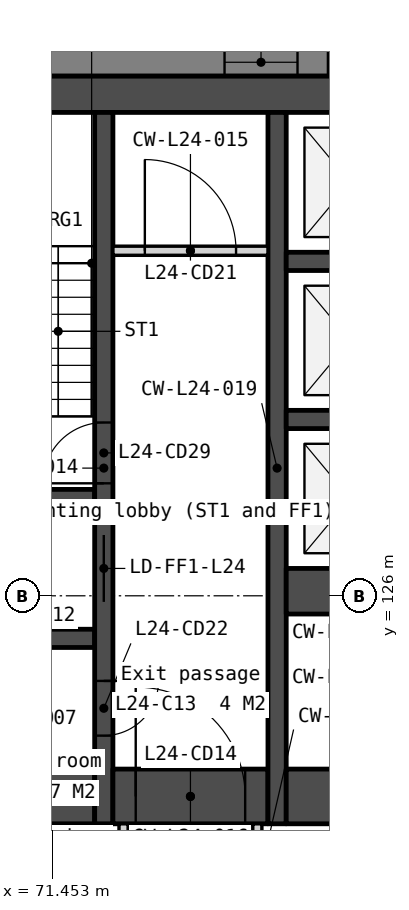
"""IFC4 building model, lengths in metres.
Left out: names, types, materials, properties, quantities, classifications, styles, units other than length and angle.
Written with IfcOpenShell. Run it as: python <this file> out.ifc"""

import sys

from ifc_helpers import new_model, si_unit, direction, frame, frame_2d, origin, place, context, subcontext, project, spatial, polyline, rectangle, outline, extrude, element, fill, save


model = new_model("IFC4")
c1 = context("Model", 3, precision=1e-05, world=origin(), true_north=direction((0.0, 1.0)))
c2 = subcontext(c1, "Body", "Model", "MODEL_VIEW")
j1 = project(units=[si_unit("LENGTHUNIT", "METRE"), si_unit("PLANEANGLEUNIT", "RADIAN")], contexts=[c1])
p1 = place(None, origin())
s1 = spatial("IfcSite", under=j1, at=p1, CompositionType="ELEMENT")
p2 = place(p1, origin())
s2 = spatial("IfcBuilding", under=s1, at=p2, CompositionType="ELEMENT")
p3 = place(p2, frame((0.0, 0.0, 99.3)))
s3 = spatial("IfcBuildingStorey", under=s2, at=p3, CompositionType="ELEMENT", Elevation=99.3)
p4 = place(p3, frame((66.0, 134.25, 0.0), z_axis=(0.0, 0.0, 1.0), x_axis=(1.0, 0.0, 0.0)))
e1 = element("IfcWall", 1, at=p4, inside=s3, PredefinedType="SOLIDWALL", context=c2, shape_type="SweptSolid", body=[
    extrude(rectangle(XDim=28.0, YDim=0.6, at=frame_2d((14.0, 0.0))), origin(), (0.0, 0.0, 1.0), 3.35),
])
for number, where, z_axis, x_axis in (
    (2, (69.6, 127.6, 0.0), (0.0, 0.0, 1.0), (1.0, 0.0, 0.0)),
    (3, (69.6, 125.3, 0.0), (0.0, 0.0, 1.0), (1.0, 0.0, 0.0)),
):
    element("IfcWall", number, at=place(p3, frame(where, z_axis=z_axis, x_axis=x_axis)), inside=s3, PredefinedType="SOLIDWALL", context=c2, shape_type="SweptSolid", body=[
        extrude(rectangle(XDim=2.55, YDim=0.3, at=frame_2d((1.275, 0.0))), origin(), (0.0, 0.0, 1.0), 3.35),
    ])
p5 = place(p3, frame((69.6, 122.7, 0.0), z_axis=(0.0, 0.0, 1.0), x_axis=(1.0, 0.0, 0.0)))
e4 = element("IfcWall", 4, at=p5, inside=s3, PredefinedType="SOLIDWALL", context=c2, shape_type="SweptSolid", body=[
    extrude(rectangle(XDim=2.55, YDim=0.9, at=frame_2d((1.275, 0.0))), origin(), (0.0, 0.0, 1.0), 3.35),
])
p6 = place(p3, frame((72.3, 133.95, 0.0), z_axis=(0.0, 0.0, 1.0), x_axis=(0.0, -1.0, 0.0)))
e5 = element("IfcWall", 5, at=p6, inside=s3, PredefinedType="SOLIDWALL", context=c2, shape_type="SweptSolid", body=[
    extrude(rectangle(XDim=11.7, YDim=0.3, at=frame_2d((5.85, 0.0))), origin(), (0.0, 0.0, 1.0), 3.35),
])
p7 = place(p6, frame((6.95, 0.0, 0.0)))
e6 = element("IfcOpeningElement", 6, at=p7, cuts=e5, PredefinedType="OPENING", context=c2, shape_type="SweptSolid", body=[
    extrude(rectangle(XDim=1.1, YDim=2.1, at=frame_2d((0.55, 1.05))), frame((0.0, 0.16, 0.0), z_axis=(0.0, -1.0, 0.0), x_axis=(1.0, 0.0, 0.0)), (0.0, 0.0, 1.0), 0.32),
])
p8 = place(p6, frame((9.35, 0.0, 0.0)))
e7 = element("IfcOpeningElement", 7, at=p8, cuts=e5, PredefinedType="OPENING", context=c2, shape_type="SweptSolid", body=[
    extrude(rectangle(XDim=0.9, YDim=2.1, at=frame_2d((0.45, 1.05))), frame((0.0, 0.16, 0.0), z_axis=(0.0, -1.0, 0.0), x_axis=(1.0, 0.0, 0.0)), (0.0, 0.0, 1.0), 0.32),
])
p9 = place(p6, frame((5.1, 0.0, 0.0)))
e8 = element("IfcOpeningElement", 8, at=p9, cuts=e5, PredefinedType="OPENING", context=c2, shape_type="SweptSolid", body=[
    extrude(rectangle(XDim=1.0, YDim=2.1, at=frame_2d((0.5, 1.05))), frame((0.0, 0.16, 0.0), z_axis=(0.0, -1.0, 0.0), x_axis=(1.0, 0.0, 0.0)), (0.0, 0.0, 1.0), 0.32),
])
p10 = place(p3, frame((72.45, 131.675, 0.0), z_axis=(0.0, 0.0, 1.0), x_axis=(1.0, 0.0, 0.0)))
e9 = element("IfcWall", 9, at=p10, inside=s3, PredefinedType="PARTITIONING", context=c2, shape_type="SweptSolid", body=[
    extrude(rectangle(XDim=2.55, YDim=0.15, at=frame_2d((1.275, 0.0))), origin(), (0.0, 0.0, 1.0), 3.35),
])
p11 = place(p10, frame((0.525, 0.0, 0.0)))
e10 = element("IfcOpeningElement", 10, at=p11, cuts=e9, PredefinedType="OPENING", context=c2, shape_type="SweptSolid", body=[
    extrude(rectangle(XDim=1.5, YDim=2.1, at=frame_2d((0.75, 1.05))), frame((0.0, 0.085, 0.0), z_axis=(0.0, -1.0, 0.0), x_axis=(1.0, 0.0, 0.0)), (0.0, 0.0, 1.0), 0.17),
])
p12 = place(p3, frame((72.45, 122.7, 0.0), z_axis=(0.0, 0.0, 1.0), x_axis=(1.0, 0.0, 0.0)))
e11 = element("IfcWall", 11, at=p12, inside=s3, PredefinedType="SOLIDWALL", context=c2, shape_type="SweptSolid", body=[
    extrude(rectangle(XDim=2.55, YDim=0.9, at=frame_2d((1.275, 0.0))), origin(), (0.0, 0.0, 1.0), 3.35),
])
p13 = place(p12, frame((0.375, 0.0, 0.0)))
e12 = element("IfcOpeningElement", 12, at=p13, cuts=e11, PredefinedType="OPENING", context=c2, shape_type="SweptSolid", body=[
    extrude(rectangle(XDim=1.8, YDim=2.1, at=frame_2d((0.9, 1.05))), frame((0.0, 0.46, 0.0), z_axis=(0.0, -1.0, 0.0), x_axis=(1.0, 0.0, 0.0)), (0.0, 0.0, 1.0), 0.92),
])
for number, where, z_axis, x_axis in (
    (13, (72.625, 122.25, 0.0), (0.0, 0.0, 1.0), (0.0, -1.0, 0.0)),
    (14, (74.825, 122.25, 0.0), (0.0, 0.0, 1.0), (0.0, -1.0, 0.0)),
):
    element("IfcWall", number, at=place(p3, frame(where, z_axis=z_axis, x_axis=x_axis)), inside=s3, PredefinedType="PARTITIONING", context=c2, shape_type="SweptSolid", body=[
        extrude(rectangle(XDim=2.1, YDim=0.15, at=frame_2d((1.05, 0.0))), origin(), (0.0, 0.0, 1.0), 3.35),
    ])
p14 = place(p3, frame((75.15, 133.95, 0.0), z_axis=(0.0, 0.0, 1.0), x_axis=(0.0, -1.0, 0.0)))
e15 = element("IfcWall", 15, at=p14, inside=s3, PredefinedType="SOLIDWALL", context=c2, shape_type="SweptSolid", body=[
    extrude(rectangle(XDim=11.7, YDim=0.3, at=frame_2d((5.85, 0.0))), origin(), (0.0, 0.0, 1.0), 3.35),
])
for number, where, z_axis, x_axis in (
    (16, (75.3, 131.5, 0.0), (0.0, 0.0, 1.0), (1.0, 0.0, 0.0)),
    (17, (75.3, 128.9, 0.0), (0.0, 0.0, 1.0), (1.0, 0.0, 0.0)),
):
    element("IfcWall", number, at=place(p3, frame(where, z_axis=z_axis, x_axis=x_axis)), inside=s3, PredefinedType="SOLIDWALL", context=c2, shape_type="SweptSolid", body=[
        extrude(rectangle(XDim=2.1, YDim=0.3, at=frame_2d((1.05, 0.0))), origin(), (0.0, 0.0, 1.0), 3.35),
    ])
p15 = place(p3, frame((75.3, 126.075, 0.0), z_axis=(0.0, 0.0, 1.0), x_axis=(1.0, 0.0, 0.0)))
e18 = element("IfcWall", 18, at=p15, inside=s3, PredefinedType="SOLIDWALL", context=c2, shape_type="SweptSolid", body=[
    extrude(rectangle(XDim=2.1, YDim=0.75, at=frame_2d((1.05, 0.0))), origin(), (0.0, 0.0, 1.0), 3.35),
])
p16 = place(p3, frame((75.3, 122.7, 0.0), z_axis=(0.0, 0.0, 1.0), x_axis=(1.0, 0.0, 0.0)))
e19 = element("IfcWall", 19, at=p16, inside=s3, PredefinedType="SOLIDWALL", context=c2, shape_type="SweptSolid", body=[
    extrude(rectangle(XDim=6.2, YDim=0.9, at=frame_2d((3.1, 0.0))), origin(), (0.0, 0.0, 1.0), 3.35),
])
p17 = place(p3, frame((101.322, 134.775, -0.15), z_axis=(0.0, 0.0, 1.0), x_axis=(-1.0, 0.0, 0.0)))
e20 = element("IfcWall", 20, at=p17, inside=s3, PredefinedType="SOLIDWALL", context=c2, shape_type="SweptSolid", body=[
    extrude(outline(polyline([(42.643, 0.0), (42.643, 3.5), (0.0, 3.5), (0.0, 0.0), (42.643, 0.0)])), frame((0.0, 0.225, 0.0), z_axis=(0.0, -1.0, 0.0), x_axis=(1.0, 0.0, 0.0)), (0.0, 0.0, 1.0), 0.45),
])
p18 = place(p17, frame((7.079, 0.0, 1.05)))
e21 = element("IfcOpeningElement", 21, at=p18, cuts=e20, PredefinedType="OPENING", context=c2, shape_type="SweptSolid", body=[
    extrude(rectangle(XDim=1.2, YDim=1.5, at=frame_2d((0.6, 0.75))), frame((0.0, 0.235, 0.0), z_axis=(0.0, -1.0, 0.0), x_axis=(1.0, 0.0, 0.0)), (0.0, 0.0, 1.0), 0.47),
])
p19 = place(p17, frame((8.779, 0.0, 1.05)))
e22 = element("IfcOpeningElement", 22, at=p19, cuts=e20, PredefinedType="OPENING", context=c2, shape_type="SweptSolid", body=[
    extrude(rectangle(XDim=1.2, YDim=1.5, at=frame_2d((0.6, 0.75))), frame((0.0, 0.235, 0.0), z_axis=(0.0, -1.0, 0.0), x_axis=(1.0, 0.0, 0.0)), (0.0, 0.0, 1.0), 0.47),
])
p20 = place(p17, frame((15.607, 0.0, 1.05)))
e23 = element("IfcOpeningElement", 23, at=p20, cuts=e20, PredefinedType="OPENING", context=c2, shape_type="SweptSolid", body=[
    extrude(rectangle(XDim=1.2, YDim=1.5, at=frame_2d((0.6, 0.75))), frame((0.0, 0.235, 0.0), z_axis=(0.0, -1.0, 0.0), x_axis=(1.0, 0.0, 0.0)), (0.0, 0.0, 1.0), 0.47),
])
p21 = place(p17, frame((17.307, 0.0, 1.05)))
e24 = element("IfcOpeningElement", 24, at=p21, cuts=e20, PredefinedType="OPENING", context=c2, shape_type="SweptSolid", body=[
    extrude(rectangle(XDim=1.2, YDim=1.5, at=frame_2d((0.6, 0.75))), frame((0.0, 0.235, 0.0), z_axis=(0.0, -1.0, 0.0), x_axis=(1.0, 0.0, 0.0)), (0.0, 0.0, 1.0), 0.47),
])
p22 = place(p17, frame((24.136, 0.0, 1.05)))
e25 = element("IfcOpeningElement", 25, at=p22, cuts=e20, PredefinedType="OPENING", context=c2, shape_type="SweptSolid", body=[
    extrude(rectangle(XDim=1.2, YDim=1.5, at=frame_2d((0.6, 0.75))), frame((0.0, 0.235, 0.0), z_axis=(0.0, -1.0, 0.0), x_axis=(1.0, 0.0, 0.0)), (0.0, 0.0, 1.0), 0.47),
])
p23 = place(p17, frame((25.836, 0.0, 1.05)))
e26 = element("IfcOpeningElement", 26, at=p23, cuts=e20, PredefinedType="OPENING", context=c2, shape_type="SweptSolid", body=[
    extrude(rectangle(XDim=1.2, YDim=1.5, at=frame_2d((0.6, 0.75))), frame((0.0, 0.235, 0.0), z_axis=(0.0, -1.0, 0.0), x_axis=(1.0, 0.0, 0.0)), (0.0, 0.0, 1.0), 0.47),
])
p24 = place(p17, frame((32.665, 0.0, 1.05)))
e27 = element("IfcOpeningElement", 27, at=p24, cuts=e20, PredefinedType="OPENING", context=c2, shape_type="SweptSolid", body=[
    extrude(rectangle(XDim=1.2, YDim=1.5, at=frame_2d((0.6, 0.75))), frame((0.0, 0.235, 0.0), z_axis=(0.0, -1.0, 0.0), x_axis=(1.0, 0.0, 0.0)), (0.0, 0.0, 1.0), 0.47),
])
p25 = place(p17, frame((34.365, 0.0, 1.05)))
e28 = element("IfcOpeningElement", 28, at=p25, cuts=e20, PredefinedType="OPENING", context=c2, shape_type="SweptSolid", body=[
    extrude(rectangle(XDim=1.2, YDim=1.5, at=frame_2d((0.6, 0.75))), frame((0.0, 0.235, 0.0), z_axis=(0.0, -1.0, 0.0), x_axis=(1.0, 0.0, 0.0)), (0.0, 0.0, 1.0), 0.47),
])
p26 = place(p7, origin())
e29 = element("IfcDoor", 29, at=p26, inside=s3, OperationType="SLIDING_TO_LEFT", PredefinedType="DOOR", context=c2, shape_type="SweptSolid", body=[
    extrude(rectangle(XDim=1.1, YDim=2.1, at=frame_2d((0.55, 1.05))), frame((0.0, 0.025, 0.0), z_axis=(0.0, -1.0, 0.0), x_axis=(1.0, 0.0, 0.0)), (0.0, 0.0, 1.0), 0.05),
])
fill(e6, e29)
p27 = place(p13, origin())
e30 = element("IfcDoor", 30, at=p27, inside=s3, OperationType="DOUBLE_DOOR_DOUBLE_SWING", PredefinedType="DOOR", context=c2, shape_type="SweptSolid", body=[
    extrude(rectangle(XDim=1.8, YDim=2.1, at=frame_2d((0.9, 1.05))), frame((0.0, 0.025, 0.0), z_axis=(0.0, -1.0, 0.0), x_axis=(1.0, 0.0, 0.0)), (0.0, 0.0, 1.0), 0.05),
])
fill(e12, e30)
p28 = place(p11, origin())
e31 = element("IfcDoor", 31, at=p28, inside=s3, OperationType="DOUBLE_DOOR_DOUBLE_SWING", PredefinedType="DOOR", context=c2, shape_type="SweptSolid", body=[
    extrude(rectangle(XDim=1.5, YDim=2.1, at=frame_2d((0.75, 1.05))), frame((0.0, 0.025, 0.0), z_axis=(0.0, -1.0, 0.0), x_axis=(1.0, 0.0, 0.0)), (0.0, 0.0, 1.0), 0.05),
])
fill(e10, e31)
p29 = place(p8, origin())
e32 = element("IfcDoor", 32, at=p29, inside=s3, OperationType="SINGLE_SWING_LEFT", PredefinedType="DOOR", context=c2, shape_type="SweptSolid", body=[
    extrude(rectangle(XDim=0.9, YDim=2.1, at=frame_2d((0.45, 1.05))), frame((0.0, 0.025, 0.0), z_axis=(0.0, -1.0, 0.0), x_axis=(1.0, 0.0, 0.0)), (0.0, 0.0, 1.0), 0.05),
])
fill(e7, e32)
p30 = place(p9, origin())
e33 = element("IfcDoor", 33, at=p30, inside=s3, OperationType="SINGLE_SWING_RIGHT", PredefinedType="DOOR", context=c2, shape_type="SweptSolid", body=[
    extrude(rectangle(XDim=1.0, YDim=2.1, at=frame_2d((0.5, 1.05))), frame((0.0, 0.025, 0.0), z_axis=(0.0, -1.0, 0.0), x_axis=(1.0, 0.0, 0.0)), (0.0, 0.0, 1.0), 0.05),
])
fill(e8, e33)
p31 = place(p22, origin())
e34 = element("IfcWindow", 34, at=p31, inside=s3, PartitioningType="SINGLE_PANEL", PredefinedType="WINDOW", context=c2, shape_type="SweptSolid", body=[
    extrude(rectangle(XDim=1.2, YDim=1.5, at=frame_2d((0.6, 0.75))), frame((0.0, 0.03, 0.0), z_axis=(0.0, -1.0, 0.0), x_axis=(1.0, 0.0, 0.0)), (0.0, 0.0, 1.0), 0.06),
])
fill(e25, e34)
p32 = place(p23, origin())
e35 = element("IfcWindow", 35, at=p32, inside=s3, PartitioningType="SINGLE_PANEL", PredefinedType="WINDOW", context=c2, shape_type="SweptSolid", body=[
    extrude(rectangle(XDim=1.2, YDim=1.5, at=frame_2d((0.6, 0.75))), frame((0.0, 0.03, 0.0), z_axis=(0.0, -1.0, 0.0), x_axis=(1.0, 0.0, 0.0)), (0.0, 0.0, 1.0), 0.06),
])
fill(e26, e35)
save(model, sys.argv[1])
